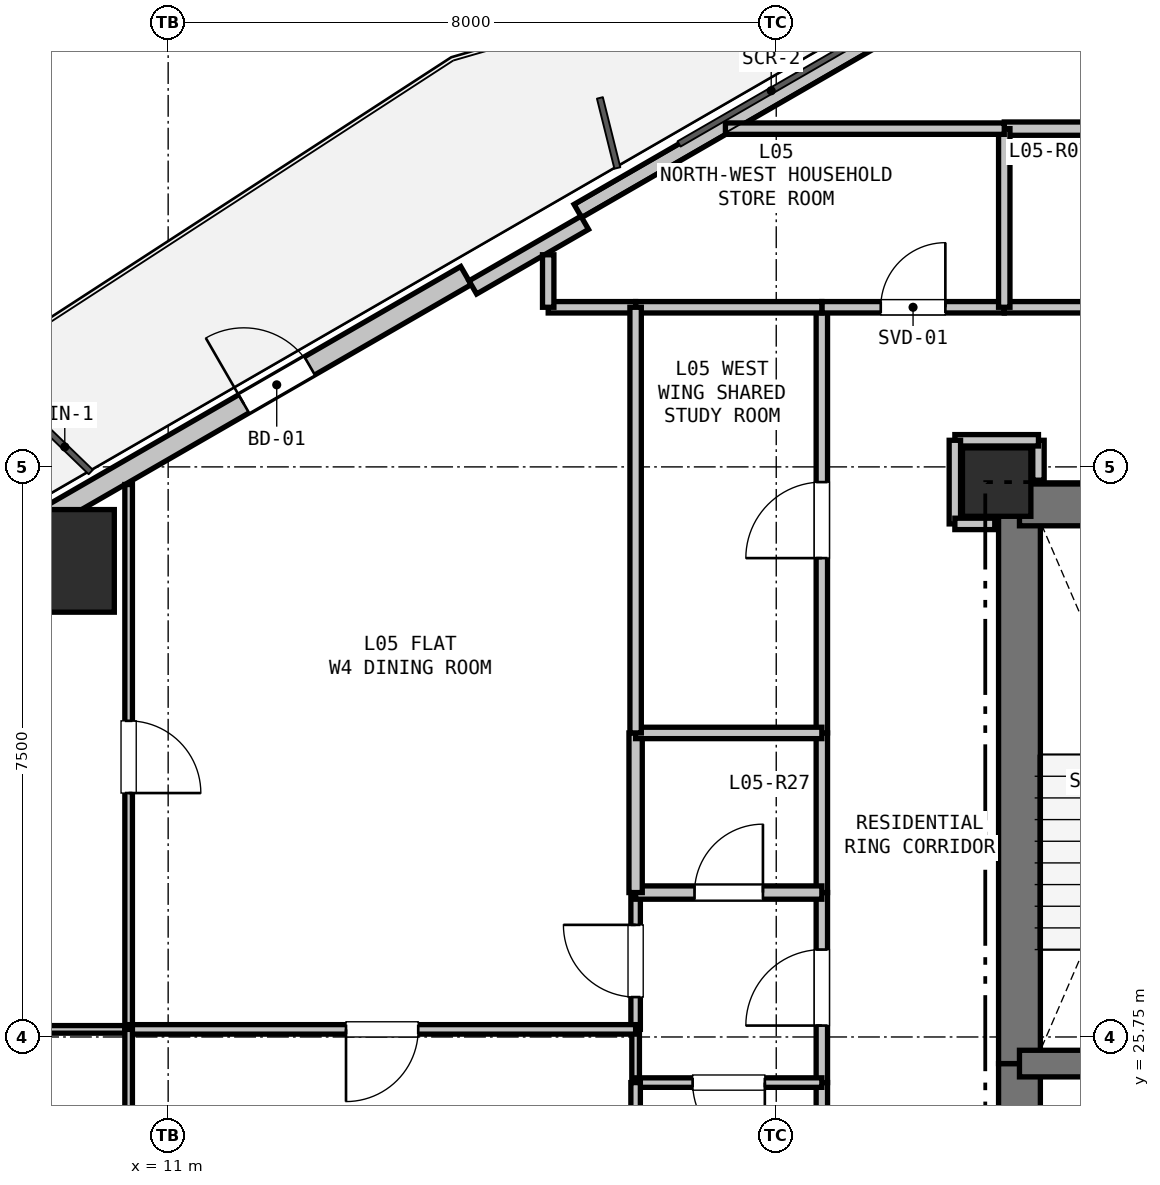
"""IFC4 building model, lengths in metres.
Left out: names, types, materials, properties, quantities, classifications, styles, units other than length and angle.
Written with IfcOpenShell. Run it as: python <this file> out.ifc"""

import sys

from ifc_helpers import new_model, si_unit, direction, frame, frame_2d, origin, origin_2d, place, context, subcontext, project, spatial, rectangle, hollow_rectangle, extrude, element, fill, save


model = new_model("IFC4")
c1 = context("Model", 3, precision=1e-05, world=origin(), true_north=direction((0.0, 1.0)))
c2 = subcontext(c1, "Body", "Model", "MODEL_VIEW")
j1 = project(units=[si_unit("LENGTHUNIT", "METRE"), si_unit("PLANEANGLEUNIT", "RADIAN")], contexts=[c1])
p1 = place(None, origin())
s1 = spatial("IfcSite", under=j1, at=p1, CompositionType="ELEMENT")
p2 = place(p1, origin())
s2 = spatial("IfcBuilding", under=s1, at=p2, CompositionType="ELEMENT")
p3 = place(p2, frame((0.0, 0.0, 22.5)))
s3 = spatial("IfcBuildingStorey", under=s2, at=p3, CompositionType="ELEMENT", Elevation=22.5)
p4 = place(p3, frame((21.9, 33.05, 0.0), z_axis=(0.0, 0.0, 1.0), x_axis=(1.0, 0.0, 0.0)))
e1 = element("IfcColumn", 1, at=p4, inside=s3, PredefinedType="COLUMN", context=c2, shape_type="SweptSolid", body=[
    extrude(rectangle(XDim=0.9, YDim=0.9, at=origin_2d()), origin(), (0.0, 0.0, 1.0), 3.3),
])
p5 = place(p3, frame((9.617, 32.014, 0.0), z_axis=(0.0, 0.0, 1.0), x_axis=(1.0, 0.0, 0.0)))
e2 = element("IfcColumn", 2, at=p5, inside=s3, PredefinedType="COLUMN", context=c2, shape_type="SweptSolid", body=[
    extrude(hollow_rectangle(XDim=1.35, YDim=1.35, WallThickness=0.036, at=origin_2d()), origin(), (0.0, 0.0, 1.0), 3.3),
])
p6 = place(p3, frame((3.943, 29.431, 0.0), z_axis=(0.0, 0.0, 1.0), x_axis=(0.866027105532, 0.499997052475, 0.0)))
e3 = element("IfcWall", 3, at=p6, inside=s3, PredefinedType="SOLIDWALL", context=c2, shape_type="SweptSolid", body=[
    extrude(rectangle(XDim=12.673, YDim=0.275, at=frame_2d((6.336, 0.0))), origin(), (0.0, 0.0, 1.0), 2.66),
])
p7 = place(p6, frame((9.298, 0.0, 0.0)))
e4 = element("IfcOpeningElement", 4, at=p7, cuts=e3, PredefinedType="OPENING", context=c2, shape_type="SweptSolid", body=[
    extrude(rectangle(XDim=1.0, YDim=2.1, at=frame_2d((0.5, 1.05))), frame((0.0, 0.147, 0.0), z_axis=(0.0, -1.0, 0.0), x_axis=(1.0, 0.0, 0.0)), (0.0, 0.0, 1.0), 0.295),
])
p8 = place(p3, frame((16.39, 36.617, 0.0), z_axis=(0.0, 0.0, 1.0), x_axis=(0.866027351828, 0.499996625875, 0.0)))
e5 = element("IfcWall", 5, at=p8, inside=s3, PredefinedType="PARAPET", context=c2, shape_type="SweptSolid", body=[
    extrude(rectangle(XDim=11.973, YDim=0.2, at=frame_2d((5.987, 0.0))), origin(), (0.0, 0.0, 1.0), 0.2),
])
p9 = place(p3, frame((15.008, 35.611, 0.0), z_axis=(0.0, 0.0, 1.0), x_axis=(0.86605165483, 0.499954529098, 0.0)))
e6 = element("IfcWall", 6, at=p9, inside=s3, PredefinedType="PARAPET", context=c2, shape_type="SweptSolid", body=[
    extrude(rectangle(XDim=1.7, YDim=0.2, at=frame_2d((0.85, 0.0))), origin(), (0.0, 0.0, 1.0), 2.66),
])
p10 = place(p3, frame((22.2, 20.75, 0.0), z_axis=(0.0, 0.0, 1.0), x_axis=(0.0, 1.0, 0.0)))
e7 = element("IfcWall", 7, at=p10, inside=s3, PredefinedType="SHEAR", context=c2, shape_type="SweptSolid", body=[
    extrude(rectangle(XDim=4.65, YDim=0.55, at=frame_2d((2.325, 0.0))), origin(), (0.0, 0.0, 1.0), 3.04),
])
p11 = place(p3, frame((22.2, 25.4, 0.0), z_axis=(0.0, 0.0, 1.0), x_axis=(0.0, 1.0, 0.0)))
e8 = element("IfcWall", 8, at=p11, inside=s3, PredefinedType="SHEAR", context=c2, shape_type="SweptSolid", body=[
    extrude(rectangle(XDim=7.35, YDim=0.55, at=frame_2d((3.675, 0.0))), origin(), (0.0, 0.0, 1.0), 3.04),
])
p12 = place(p3, frame((22.2, 32.75, 0.0), z_axis=(0.0, 0.0, 1.0), x_axis=(1.0, 0.0, 0.0)))
e9 = element("IfcWall", 9, at=p12, inside=s3, PredefinedType="SHEAR", context=c2, shape_type="SweptSolid", body=[
    extrude(rectangle(XDim=3.45, YDim=0.55, at=frame_2d((1.725, 0.0))), origin(), (0.0, 0.0, 1.0), 3.04),
])
p13 = place(p3, frame((22.2, 25.4, 0.0), z_axis=(0.0, 0.0, 1.0), x_axis=(1.0, 0.0, 0.0)))
e10 = element("IfcWall", 10, at=p13, inside=s3, PredefinedType="SHEAR", context=c2, shape_type="SweptSolid", body=[
    extrude(rectangle(XDim=3.45, YDim=0.35, at=frame_2d((1.725, 0.0))), origin(), (0.0, 0.0, 1.0), 3.04),
])
p14 = place(p13, frame((1.15, 0.0, 0.0)))
e11 = element("IfcOpeningElement", 11, at=p14, cuts=e10, PredefinedType="OPENING", context=c2, shape_type="SweptSolid", body=[
    extrude(rectangle(XDim=1.15, YDim=2.15, at=frame_2d((0.575, 1.075))), frame((0.0, 0.185, 0.0), z_axis=(0.0, -1.0, 0.0), x_axis=(1.0, 0.0, 0.0)), (0.0, 0.0, 1.0), 0.37),
])
p15 = place(p3, frame((19.6, 21.15, 0.0), z_axis=(0.0, 0.0, 1.0), x_axis=(0.0, 1.0, 0.0)))
e12 = element("IfcWall", 12, at=p15, inside=s3, PredefinedType="PARTITIONING", context=c2, shape_type="SweptSolid", body=[
    extrude(rectangle(XDim=4.0, YDim=0.15, at=frame_2d((2.0, 0.0))), origin(), (0.0, 0.0, 1.0), 3.04),
])
p16 = place(p3, frame((19.6, 25.15, 0.0), z_axis=(0.0, 0.0, 1.0), x_axis=(0.0, 1.0, 0.0)))
e13 = element("IfcWall", 13, at=p16, inside=s3, PredefinedType="PARTITIONING", context=c2, shape_type="SweptSolid", body=[
    extrude(rectangle(XDim=2.5, YDim=0.15, at=frame_2d((1.25, 0.0))), origin(), (0.0, 0.0, 1.0), 3.04),
])
p17 = place(p16, frame((0.75, 0.0, 0.0)))
e14 = element("IfcOpeningElement", 14, at=p17, cuts=e13, PredefinedType="OPENING", context=c2, shape_type="SweptSolid", body=[
    extrude(rectangle(XDim=1.0, YDim=2.15, at=frame_2d((0.5, 1.075))), frame((0.0, 0.085, 0.0), z_axis=(0.0, -1.0, 0.0), x_axis=(1.0, 0.0, 0.0)), (0.0, 0.0, 1.0), 0.17),
])
p18 = place(p3, frame((19.6, 27.65, 0.0), z_axis=(0.0, 0.0, 1.0), x_axis=(0.0, 1.0, 0.0)))
e15 = element("IfcWall", 15, at=p18, inside=s3, PredefinedType="PARTITIONING", context=c2, shape_type="SweptSolid", body=[
    extrude(rectangle(XDim=2.1, YDim=0.15, at=frame_2d((1.05, 0.0))), origin(), (0.0, 0.0, 1.0), 3.04),
])
p19 = place(p3, frame((19.6, 29.75, 0.0), z_axis=(0.0, 0.0, 1.0), x_axis=(0.0, 1.0, 0.0)))
e16 = element("IfcWall", 16, at=p19, inside=s3, PredefinedType="PARTITIONING", context=c2, shape_type="SweptSolid", body=[
    extrude(rectangle(XDim=5.6, YDim=0.15, at=frame_2d((2.8, 0.0))), origin(), (0.0, 0.0, 1.0), 2.337),
])
p20 = place(p19, frame((2.3, 0.0, 0.0)))
e17 = element("IfcOpeningElement", 17, at=p20, cuts=e16, PredefinedType="OPENING", context=c2, shape_type="SweptSolid", body=[
    extrude(rectangle(XDim=1.0, YDim=2.15, at=frame_2d((0.5, 1.075))), frame((0.0, 0.085, 0.0), z_axis=(0.0, -1.0, 0.0), x_axis=(1.0, 0.0, 0.0)), (0.0, 0.0, 1.0), 0.17),
])
p21 = place(p3, frame((19.6, 35.35, 0.0), z_axis=(0.0, 0.0, 1.0), x_axis=(1.0, 0.0, 0.0)))
e18 = element("IfcWall", 18, at=p21, inside=s3, PredefinedType="PARTITIONING", context=c2, shape_type="SweptSolid", body=[
    extrude(rectangle(XDim=2.4, YDim=0.15, at=frame_2d((1.2, 0.0))), origin(), (0.0, 0.0, 1.0), 3.04),
])
p22 = place(p21, frame((0.775, 0.0, 0.0)))
e19 = element("IfcOpeningElement", 19, at=p22, cuts=e18, PredefinedType="OPENING", context=c2, shape_type="SweptSolid", body=[
    extrude(rectangle(XDim=0.85, YDim=2.1, at=frame_2d((0.425, 1.05))), frame((0.0, 0.085, 0.0), z_axis=(0.0, -1.0, 0.0), x_axis=(1.0, 0.0, 0.0)), (0.0, 0.0, 1.0), 0.17),
])
p23 = place(p3, frame((22.0, 35.35, 0.0), z_axis=(0.0, 0.0, 1.0), x_axis=(1.0, 0.0, 0.0)))
e20 = element("IfcWall", 20, at=p23, inside=s3, PredefinedType="PARTITIONING", context=c2, shape_type="SweptSolid", body=[
    extrude(rectangle(XDim=2.0, YDim=0.15, at=frame_2d((1.0, 0.0))), origin(), (0.0, 0.0, 1.0), 3.04),
])
p24 = place(p3, frame((22.45, 33.075, 0.0), z_axis=(0.0, 0.0, 1.0), x_axis=(0.0, 1.0, 0.0)))
e21 = element("IfcWall", 21, at=p24, inside=s3, PredefinedType="PARTITIONING", context=c2, shape_type="SweptSolid", body=[
    extrude(rectangle(XDim=0.525, YDim=0.15, at=frame_2d((0.263, 0.0))), origin(), (0.0, 0.0, 1.0), 2.488),
])
p25 = place(p3, frame((22.45, 33.6, 0.0), z_axis=(0.0, 0.0, 1.0), x_axis=(-1.0, 0.0, 0.0)))
e22 = element("IfcWall", 22, at=p25, inside=s3, PredefinedType="PARTITIONING", context=c2, shape_type="SweptSolid", body=[
    extrude(rectangle(XDim=1.1, YDim=0.15, at=frame_2d((0.55, 0.0))), origin(), (0.0, 0.0, 1.0), 3.04),
])
p26 = place(p3, frame((21.35, 33.6, 0.0), z_axis=(0.0, 0.0, 1.0), x_axis=(0.0, -1.0, 0.0)))
e23 = element("IfcWall", 23, at=p26, inside=s3, PredefinedType="PARTITIONING", context=c2, shape_type="SweptSolid", body=[
    extrude(rectangle(XDim=1.1, YDim=0.15, at=frame_2d((0.55, 0.0))), origin(), (0.0, 0.0, 1.0), 2.337),
])
p27 = place(p3, frame((21.35, 32.5, 0.0), z_axis=(0.0, 0.0, 1.0), x_axis=(1.0, 0.0, 0.0)))
e24 = element("IfcWall", 24, at=p27, inside=s3, PredefinedType="PARTITIONING", context=c2, shape_type="SweptSolid", body=[
    extrude(rectangle(XDim=0.525, YDim=0.15, at=frame_2d((0.262, 0.0))), origin(), (0.0, 0.0, 1.0), 2.488),
])
p28 = place(p3, frame((17.15, 25.15, 0.0), z_axis=(0.0, 0.0, 1.0), x_axis=(0.0, 1.0, 0.0)))
e25 = element("IfcWall", 25, at=p28, inside=s3, PredefinedType="PARTITIONING", context=c2, shape_type="SweptSolid", body=[
    extrude(rectangle(XDim=0.7, YDim=0.1, at=frame_2d((0.35, 0.0))), origin(), (0.0, 0.0, 1.0), 3.04),
])
p29 = place(p3, frame((17.15, 25.85, 0.0), z_axis=(0.0, 0.0, 1.0), x_axis=(0.0, 1.0, 0.0)))
e26 = element("IfcWall", 26, at=p29, inside=s3, PredefinedType="PARTITIONING", context=c2, shape_type="SweptSolid", body=[
    extrude(rectangle(XDim=1.8, YDim=0.125, at=frame_2d((0.9, 0.0))), origin(), (0.0, 0.0, 1.0), 3.04),
])
p30 = place(p29, frame((0.425, 0.0, 0.0)))
e27 = element("IfcOpeningElement", 27, at=p30, cuts=e26, PredefinedType="OPENING", context=c2, shape_type="SweptSolid", body=[
    extrude(rectangle(XDim=0.95, YDim=2.1, at=frame_2d((0.475, 1.05))), frame((0.0, 0.073, 0.0), z_axis=(0.0, -1.0, 0.0), x_axis=(1.0, 0.0, 0.0)), (0.0, 0.0, 1.0), 0.145),
])
p31 = place(p3, frame((17.15, 27.65, 0.0), z_axis=(0.0, 0.0, 1.0), x_axis=(1.0, 0.0, 0.0)))
e28 = element("IfcWall", 28, at=p31, inside=s3, PredefinedType="PLUMBINGWALL", context=c2, shape_type="SweptSolid", body=[
    extrude(rectangle(XDim=2.45, YDim=0.175, at=frame_2d((1.225, 0.0))), origin(), (0.0, 0.0, 1.0), 3.04),
])
p32 = place(p31, frame((0.775, 0.0, 0.0)))
e29 = element("IfcOpeningElement", 29, at=p32, cuts=e28, PredefinedType="OPENING", context=c2, shape_type="SweptSolid", body=[
    extrude(rectangle(XDim=0.9, YDim=2.1, at=frame_2d((0.45, 1.05))), frame((0.0, 0.097, 0.0), z_axis=(0.0, -1.0, 0.0), x_axis=(1.0, 0.0, 0.0)), (0.0, 0.0, 1.0), 0.195),
])
p33 = place(p3, frame((19.6, 25.15, 0.0), z_axis=(0.0, 0.0, 1.0), x_axis=(-1.0, 0.0, 0.0)))
e30 = element("IfcWall", 30, at=p33, inside=s3, PredefinedType="PARTITIONING", context=c2, shape_type="SweptSolid", body=[
    extrude(rectangle(XDim=2.45, YDim=0.125, at=frame_2d((1.225, 0.0))), origin(), (0.0, 0.0, 1.0), 3.04),
])
p34 = place(p33, frame((0.75, 0.0, 0.0)))
e31 = element("IfcOpeningElement", 31, at=p34, cuts=e30, PredefinedType="OPENING", context=c2, shape_type="SweptSolid", body=[
    extrude(rectangle(XDim=0.95, YDim=2.1, at=frame_2d((0.475, 1.05))), frame((0.0, 0.073, 0.0), z_axis=(0.0, -1.0, 0.0), x_axis=(1.0, 0.0, 0.0)), (0.0, 0.0, 1.0), 0.145),
])
p35 = place(p3, frame((22.0, 37.7, 0.0), z_axis=(0.0, 0.0, 1.0), x_axis=(1.0, 0.0, 0.0)))
e32 = element("IfcWall", 32, at=p35, inside=s3, PredefinedType="PLUMBINGWALL", context=c2, shape_type="SweptSolid", body=[
    extrude(rectangle(XDim=2.0, YDim=0.175, at=frame_2d((1.0, 0.0))), origin(), (0.0, 0.0, 1.0), 3.04),
])
p36 = place(p3, frame((22.0, 35.35, 0.0), z_axis=(0.0, 0.0, 1.0), x_axis=(0.0, 1.0, 0.0)))
e33 = element("IfcWall", 33, at=p36, inside=s3, PredefinedType="PARTITIONING", context=c2, shape_type="SweptSolid", body=[
    extrude(rectangle(XDim=2.35, YDim=0.15, at=frame_2d((1.175, 0.0))), origin(), (0.0, 0.0, 1.0), 3.04),
])
p37 = place(p3, frame((17.15, 27.65, 0.0), z_axis=(0.0, 0.0, 1.0), x_axis=(0.0, 1.0, 0.0)))
e34 = element("IfcWall", 34, at=p37, inside=s3, PredefinedType="PLUMBINGWALL", context=c2, shape_type="SweptSolid", body=[
    extrude(rectangle(XDim=2.1, YDim=0.175, at=frame_2d((1.05, 0.0))), origin(), (0.0, 0.0, 1.0), 3.04),
])
p38 = place(p3, frame((17.15, 29.75, 0.0), z_axis=(0.0, 0.0, 1.0), x_axis=(1.0, 0.0, 0.0)))
e35 = element("IfcWall", 35, at=p38, inside=s3, PredefinedType="PARTITIONING", context=c2, shape_type="SweptSolid", body=[
    extrude(rectangle(XDim=2.45, YDim=0.15, at=frame_2d((1.225, 0.0))), origin(), (0.0, 0.0, 1.0), 3.04),
])
p39 = place(p3, frame((17.15, 21.15, 0.0), z_axis=(0.0, 0.0, 1.0), x_axis=(0.0, 1.0, 0.0)))
e36 = element("IfcWall", 36, at=p39, inside=s3, PredefinedType="PARTITIONING", context=c2, shape_type="SweptSolid", body=[
    extrude(rectangle(XDim=4.0, YDim=0.125, at=frame_2d((2.0, 0.0))), origin(), (0.0, 0.0, 1.0), 2.337),
])
p40 = place(p39, frame((1.525, 0.0, 0.0)))
e37 = element("IfcOpeningElement", 37, at=p40, cuts=e36, PredefinedType="OPENING", context=c2, shape_type="SweptSolid", body=[
    extrude(rectangle(XDim=0.95, YDim=2.1, at=frame_2d((0.475, 1.05))), frame((0.0, 0.073, 0.0), z_axis=(0.0, -1.0, 0.0), x_axis=(1.0, 0.0, 0.0)), (0.0, 0.0, 1.0), 0.145),
])
p41 = place(p3, frame((19.6, 35.35, 0.0), z_axis=(0.0, 0.0, 1.0), x_axis=(-1.0, 0.0, 0.0)))
e38 = element("IfcWall", 38, at=p41, inside=s3, PredefinedType="PARTITIONING", context=c2, shape_type="SweptSolid", body=[
    extrude(rectangle(XDim=2.45, YDim=0.15, at=frame_2d((1.225, 0.0))), origin(), (0.0, 0.0, 1.0), 3.04),
])
p42 = place(p3, frame((17.15, 35.35, 0.0), z_axis=(0.0, 0.0, 1.0), x_axis=(-1.0, 0.0, 0.0)))
e39 = element("IfcWall", 39, at=p42, inside=s3, PredefinedType="PARTITIONING", context=c2, shape_type="SweptSolid", body=[
    extrude(rectangle(XDim=1.15, YDim=0.15, at=frame_2d((0.575, 0.0))), origin(), (0.0, 0.0, 1.0), 3.04),
])
p43 = place(p3, frame((16.0, 35.35, 0.0), z_axis=(0.0, 0.0, 1.0), x_axis=(0.0, 1.0, 0.0)))
e40 = element("IfcWall", 40, at=p43, inside=s3, PredefinedType="PARTITIONING", context=c2, shape_type="SweptSolid", body=[
    extrude(rectangle(XDim=0.691, YDim=0.15, at=frame_2d((0.345, 0.0))), origin(), (0.0, 0.0, 1.0), 2.365),
])
p44 = place(p3, frame((18.331, 37.7, 0.0), z_axis=(0.0, 0.0, 1.0), x_axis=(1.0, 0.0, 0.0)))
e41 = element("IfcWall", 41, at=p44, inside=s3, PredefinedType="PARTITIONING", context=c2, shape_type="SweptSolid", body=[
    extrude(rectangle(XDim=3.669, YDim=0.15, at=frame_2d((1.834, 0.0))), origin(), (0.0, 0.0, 1.0), 2.365),
])
p45 = place(p3, frame((17.15, 29.75, 0.0), z_axis=(0.0, 0.0, 1.0), x_axis=(0.0, 1.0, 0.0)))
e42 = element("IfcWall", 42, at=p45, inside=s3, PredefinedType="PARTITIONING", context=c2, shape_type="SweptSolid", body=[
    extrude(rectangle(XDim=5.6, YDim=0.15, at=frame_2d((2.8, 0.0))), origin(), (0.0, 0.0, 1.0), 2.337),
])
p46 = place(p3, frame((10.48, 25.85, 0.0), z_axis=(0.0, 0.0, 1.0), x_axis=(-1.0, 0.0, 0.0)))
e43 = element("IfcWall", 43, at=p46, inside=s3, PredefinedType="PARTITIONING", context=c2, shape_type="SweptSolid", body=[
    extrude(rectangle(XDim=6.505, YDim=0.1, at=frame_2d((3.253, 0.0))), origin(), (0.0, 0.0, 1.0), 2.65),
])
p47 = place(p46, frame((2.778, 0.0, 0.0)))
e44 = element("IfcOpeningElement", 44, at=p47, cuts=e43, PredefinedType="OPENING", context=c2, shape_type="SweptSolid", body=[
    extrude(rectangle(XDim=0.95, YDim=2.1, at=frame_2d((0.475, 1.05))), frame((0.0, 0.06, 0.0), z_axis=(0.0, -1.0, 0.0), x_axis=(1.0, 0.0, 0.0)), (0.0, 0.0, 1.0), 0.12),
])
p48 = place(p3, frame((10.48, 33.018, 0.0), z_axis=(0.0, 0.0, 1.0), x_axis=(0.0, -1.0, 0.0)))
e45 = element("IfcWall", 45, at=p48, inside=s3, PredefinedType="PARTITIONING", context=c2, shape_type="SweptSolid", body=[
    extrude(rectangle(XDim=7.168, YDim=0.1, at=frame_2d((3.584, 0.0))), origin(), (0.0, 0.0, 1.0), 2.337),
])
p49 = place(p48, frame((3.109, 0.0, 0.0)))
e46 = element("IfcOpeningElement", 46, at=p49, cuts=e45, PredefinedType="OPENING", context=c2, shape_type="SweptSolid", body=[
    extrude(rectangle(XDim=0.95, YDim=2.1, at=frame_2d((0.475, 1.05))), frame((0.0, 0.06, 0.0), z_axis=(0.0, -1.0, 0.0), x_axis=(1.0, 0.0, 0.0)), (0.0, 0.0, 1.0), 0.12),
])
p50 = place(p3, frame((17.15, 25.85, 0.0), z_axis=(0.0, 0.0, 1.0), x_axis=(-1.0, 0.0, 0.0)))
e47 = element("IfcWall", 47, at=p50, inside=s3, PredefinedType="PARTITIONING", context=c2, shape_type="SweptSolid", body=[
    extrude(rectangle(XDim=6.67, YDim=0.125, at=frame_2d((3.335, 0.0))), origin(), (0.0, 0.0, 1.0), 3.04),
])
p51 = place(p50, frame((2.86, 0.0, 0.0)))
e48 = element("IfcOpeningElement", 48, at=p51, cuts=e47, PredefinedType="OPENING", context=c2, shape_type="SweptSolid", body=[
    extrude(rectangle(XDim=0.95, YDim=2.1, at=frame_2d((0.475, 1.05))), frame((0.0, 0.073, 0.0), z_axis=(0.0, -1.0, 0.0), x_axis=(1.0, 0.0, 0.0)), (0.0, 0.0, 1.0), 0.145),
])
p52 = place(p3, frame((10.48, 25.85, 0.0), z_axis=(0.0, 0.0, 1.0), x_axis=(0.0, -1.0, 0.0)))
e49 = element("IfcWall", 49, at=p52, inside=s3, PredefinedType="PARTITIONING", context=c2, shape_type="SweptSolid", body=[
    extrude(rectangle(XDim=5.368, YDim=0.1, at=frame_2d((2.684, 0.0))), origin(), (0.0, 0.0, 1.0), 2.337),
])
p53 = place(p52, frame((2.209, 0.0, 0.0)))
e50 = element("IfcOpeningElement", 50, at=p53, cuts=e49, PredefinedType="OPENING", context=c2, shape_type="SweptSolid", body=[
    extrude(rectangle(XDim=0.95, YDim=2.1, at=frame_2d((0.475, 1.05))), frame((0.0, 0.06, 0.0), z_axis=(0.0, -1.0, 0.0), x_axis=(1.0, 0.0, 0.0)), (0.0, 0.0, 1.0), 0.12),
])
p54 = place(p7, origin())
e51 = element("IfcDoor", 51, at=p54, inside=s3, OperationType="SINGLE_SWING_LEFT", PredefinedType="DOOR", context=c2, shape_type="SweptSolid", body=[
    extrude(rectangle(XDim=1.0, YDim=2.1, at=frame_2d((0.5, 1.05))), frame((0.0, 0.025, 0.0), z_axis=(0.0, -1.0, 0.0), x_axis=(1.0, 0.0, 0.0)), (0.0, 0.0, 1.0), 0.05),
])
fill(e4, e51)
p55 = place(p17, origin())
e52 = element("IfcDoor", 52, at=p55, inside=s3, OperationType="SINGLE_SWING_LEFT", PredefinedType="DOOR", context=c2, shape_type="SweptSolid", body=[
    extrude(rectangle(XDim=1.0, YDim=2.15, at=frame_2d((0.5, 1.075))), frame((0.0, 0.025, 0.0), z_axis=(0.0, -1.0, 0.0), x_axis=(1.0, 0.0, 0.0)), (0.0, 0.0, 1.0), 0.05),
])
fill(e14, e52)
p56 = place(p22, origin())
e53 = element("IfcDoor", 53, at=p56, inside=s3, OperationType="SINGLE_SWING_RIGHT", PredefinedType="DOOR", context=c2, shape_type="SweptSolid", body=[
    extrude(rectangle(XDim=0.85, YDim=2.1, at=frame_2d((0.425, 1.05))), frame((0.0, 0.025, 0.0), z_axis=(0.0, -1.0, 0.0), x_axis=(1.0, 0.0, 0.0)), (0.0, 0.0, 1.0), 0.05),
])
fill(e19, e53)
p57 = place(p20, origin())
e54 = element("IfcDoor", 54, at=p57, inside=s3, OperationType="SINGLE_SWING_LEFT", PredefinedType="DOOR", context=c2, shape_type="SweptSolid", body=[
    extrude(rectangle(XDim=1.0, YDim=2.15, at=frame_2d((0.5, 1.075))), frame((0.0, 0.025, 0.0), z_axis=(0.0, -1.0, 0.0), x_axis=(1.0, 0.0, 0.0)), (0.0, 0.0, 1.0), 0.05),
])
fill(e17, e54)
p58 = place(p32, origin())
e55 = element("IfcDoor", 55, at=p58, inside=s3, OperationType="SINGLE_SWING_RIGHT", PredefinedType="DOOR", context=c2, shape_type="SweptSolid", body=[
    extrude(rectangle(XDim=0.9, YDim=2.1, at=frame_2d((0.45, 1.05))), frame((0.0, 0.025, 0.0), z_axis=(0.0, -1.0, 0.0), x_axis=(1.0, 0.0, 0.0)), (0.0, 0.0, 1.0), 0.05),
])
fill(e29, e55)
p59 = place(p34, origin())
e56 = element("IfcDoor", 56, at=p59, inside=s3, OperationType="SINGLE_SWING_LEFT", PredefinedType="DOOR", context=c2, shape_type="SweptSolid", body=[
    extrude(rectangle(XDim=0.95, YDim=2.1, at=frame_2d((0.475, 1.05))), frame((0.0, 0.025, 0.0), z_axis=(0.0, -1.0, 0.0), x_axis=(1.0, 0.0, 0.0)), (0.0, 0.0, 1.0), 0.05),
])
fill(e31, e56)
p60 = place(p30, origin())
e57 = element("IfcDoor", 57, at=p60, inside=s3, OperationType="SINGLE_SWING_RIGHT", PredefinedType="DOOR", context=c2, shape_type="SweptSolid", body=[
    extrude(rectangle(XDim=0.95, YDim=2.1, at=frame_2d((0.475, 1.05))), frame((0.0, 0.025, 0.0), z_axis=(0.0, -1.0, 0.0), x_axis=(1.0, 0.0, 0.0)), (0.0, 0.0, 1.0), 0.05),
])
fill(e27, e57)
p61 = place(p49, origin())
e58 = element("IfcDoor", 58, at=p61, inside=s3, OperationType="SINGLE_SWING_RIGHT", PredefinedType="DOOR", context=c2, shape_type="SweptSolid", body=[
    extrude(rectangle(XDim=0.95, YDim=2.1, at=frame_2d((0.475, 1.05))), frame((0.0, 0.025, 0.0), z_axis=(0.0, -1.0, 0.0), x_axis=(1.0, 0.0, 0.0)), (0.0, 0.0, 1.0), 0.05),
])
fill(e46, e58)
p62 = place(p51, origin())
e59 = element("IfcDoor", 59, at=p62, inside=s3, OperationType="SINGLE_SWING_RIGHT", PredefinedType="DOOR", context=c2, shape_type="SweptSolid", body=[
    extrude(rectangle(XDim=0.95, YDim=2.1, at=frame_2d((0.475, 1.05))), frame((0.0, 0.025, 0.0), z_axis=(0.0, -1.0, 0.0), x_axis=(1.0, 0.0, 0.0)), (0.0, 0.0, 1.0), 0.05),
])
fill(e48, e59)
save(model, sys.argv[1])
